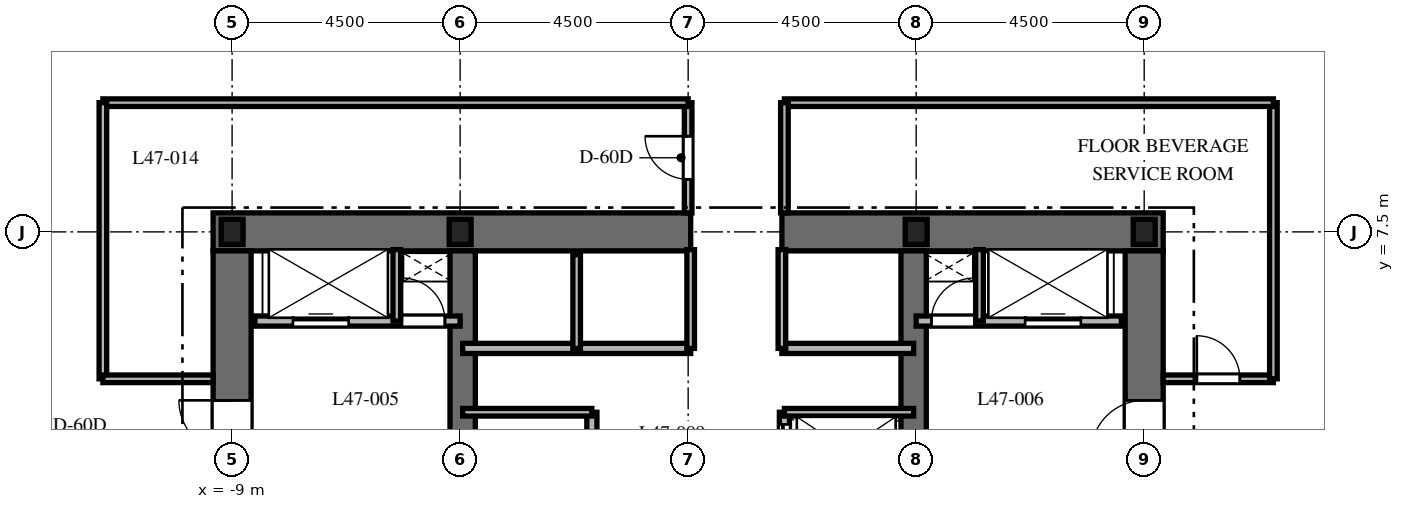
"""IFC4 building model, lengths in metres.
Left out: names, types, materials, properties, quantities, classifications, styles, units other than length and angle.
Written with IfcOpenShell. Run it as: python <this file> out.ifc"""

import sys

from ifc_helpers import new_model, si_unit, direction, frame, frame_2d, origin, origin_2d, place, context, subcontext, project, spatial, rectangle, i_section, extrude, element, fill, save


model = new_model("IFC4")
c1 = context("Model", 3, precision=1e-05, world=origin(), true_north=direction((0.0, 1.0)))
c2 = subcontext(c1, "Body", "Model", "MODEL_VIEW")
j1 = project(units=[si_unit("LENGTHUNIT", "METRE"), si_unit("PLANEANGLEUNIT", "RADIAN")], contexts=[c1])
p1 = place(None, origin())
s1 = spatial("IfcSite", under=j1, at=p1, CompositionType="ELEMENT")
p2 = place(p1, origin())
s2 = spatial("IfcBuilding", under=s1, at=p2, CompositionType="ELEMENT")
p3 = place(p2, frame((0.0, 0.0, 190.4)))
s3 = spatial("IfcBuildingStorey", under=s2, at=p3, CompositionType="ELEMENT", Elevation=190.4)
p4 = place(p3, frame((-9.375, 7.5, 0.0), z_axis=(0.0, 0.0, 1.0), x_axis=(1.0, 0.0, 0.0)))
e1 = element("IfcWall", 1, at=p4, inside=s3, PredefinedType="SHEAR", context=c2, shape_type="SweptSolid", body=[
    extrude(rectangle(XDim=9.425, YDim=0.75, at=frame_2d((4.712, 0.0))), origin(), (0.0, 0.0, 1.0), 3.7),
])
p5 = place(p3, frame((1.85, 7.5, 0.0), z_axis=(0.0, 0.0, 1.0), x_axis=(1.0, 0.0, 0.0)))
e2 = element("IfcWall", 2, at=p5, inside=s3, PredefinedType="SHEAR", context=c2, shape_type="SweptSolid", body=[
    extrude(rectangle(XDim=7.525, YDim=0.75, at=frame_2d((3.762, 0.0))), origin(), (0.0, 0.0, 1.0), 3.7),
])
p6 = place(p3, frame((-9.0, -7.125, 0.0), z_axis=(0.0, 0.0, 1.0), x_axis=(0.0, 1.0, 0.0)))
e3 = element("IfcWall", 3, at=p6, inside=s3, PredefinedType="SHEAR", context=c2, shape_type="SweptSolid", body=[
    extrude(rectangle(XDim=14.25, YDim=0.75, at=frame_2d((7.125, 0.0))), origin(), (0.0, 0.0, 1.0), 3.7),
])
p7 = place(p6, frame((10.25, 0.0, 0.0)))
e4 = element("IfcOpeningElement", 4, at=p7, cuts=e3, PredefinedType="OPENING", context=c2, shape_type="SweptSolid", body=[
    extrude(rectangle(XDim=1.05, YDim=2.15, at=frame_2d((0.525, 1.075))), frame((0.0, 0.385, 0.0), z_axis=(0.0, -1.0, 0.0), x_axis=(1.0, 0.0, 0.0)), (0.0, 0.0, 1.0), 0.77),
])
p8 = place(p3, frame((9.0, -7.125, 0.0), z_axis=(0.0, 0.0, 1.0), x_axis=(0.0, 1.0, 0.0)))
e5 = element("IfcWall", 5, at=p8, inside=s3, PredefinedType="SHEAR", context=c2, shape_type="SweptSolid", body=[
    extrude(rectangle(XDim=14.25, YDim=0.75, at=frame_2d((7.125, 0.0))), origin(), (0.0, 0.0, 1.0), 3.7),
])
p9 = place(p8, frame((10.25, 0.0, 0.0)))
e6 = element("IfcOpeningElement", 6, at=p9, cuts=e5, PredefinedType="OPENING", context=c2, shape_type="SweptSolid", body=[
    extrude(rectangle(XDim=1.05, YDim=2.15, at=frame_2d((0.525, 1.075))), frame((0.0, 0.385, 0.0), z_axis=(0.0, -1.0, 0.0), x_axis=(1.0, 0.0, 0.0)), (0.0, 0.0, 1.0), 0.77),
])
for number, where, z_axis, x_axis in (
    (7, (-4.45, 2.25, 0.0), (0.0, 0.0, 1.0), (0.0, 1.0, 0.0)),
    (8, (4.45, 2.25, 0.0), (0.0, 0.0, 1.0), (0.0, 1.0, 0.0)),
):
    element("IfcWall", number, at=place(p3, frame(where, z_axis=z_axis, x_axis=x_axis)), inside=s3, PredefinedType="SHEAR", context=c2, shape_type="SweptSolid", body=[
        extrude(rectangle(XDim=4.875, YDim=0.5, at=frame_2d((2.438, 0.0))), origin(), (0.0, 0.0, 1.0), 3.7),
    ])
for number, where, z_axis, x_axis in (
    (9, (9.0, 7.5, 0.0), (0.0, 0.0, 1.0), (1.0, 0.0, 0.0)),
    (10, (4.5, 7.5, 0.0), (0.0, 0.0, 1.0), (1.0, 0.0, 0.0)),
    (11, (-4.5, 7.5, 0.0), (0.0, 0.0, 1.0), (1.0, 0.0, 0.0)),
    (12, (-9.0, 7.5, 0.0), (0.0, 0.0, 1.0), (1.0, 0.0, 0.0)),
):
    element("IfcColumn", number, at=place(p3, frame(where, z_axis=z_axis, x_axis=x_axis)), inside=s3, PredefinedType="COLUMN", context=c2, shape_type="SweptSolid", body=[
        extrude(i_section(OverallWidth=0.432, OverallDepth=0.498, WebThickness=0.056, FlangeThickness=0.089, at=origin_2d()), origin(), (0.0, 0.0, 1.0), 3.7),
    ])
p10 = place(p3, frame((-8.55, 5.74, 0.0), z_axis=(0.0, 0.0, 1.0), x_axis=(1.0, 0.0, 0.0)))
e13 = element("IfcWall", 13, at=p10, inside=s3, PredefinedType="PARTITIONING", context=c2, shape_type="SweptSolid", body=[
    extrude(rectangle(XDim=4.05, YDim=0.2, at=frame_2d((2.025, 0.0))), origin(), (0.0, 0.0, 1.0), 3.4),
])
p11 = place(p10, frame((0.75, 0.0, 0.0)))
e14 = element("IfcOpeningElement", 14, at=p11, cuts=e13, PredefinedType="OPENING", context=c2, shape_type="SweptSolid", body=[
    extrude(rectangle(XDim=1.1, YDim=2.2, at=frame_2d((0.55, 1.1))), frame((0.0, 0.11, 0.0), z_axis=(0.0, -1.0, 0.0), x_axis=(1.0, 0.0, 0.0)), (0.0, 0.0, 1.0), 0.22),
])
p12 = place(p10, frame((2.9, 0.0, 0.0)))
e15 = element("IfcOpeningElement", 15, at=p12, cuts=e13, PredefinedType="OPENING", context=c2, shape_type="SweptSolid", body=[
    extrude(rectangle(XDim=0.85, YDim=2.03, at=frame_2d((0.425, 1.015))), frame((0.0, 0.11, 0.0), z_axis=(0.0, -1.0, 0.0), x_axis=(1.0, 0.0, 0.0)), (0.0, 0.0, 1.0), 0.22),
])
p13 = place(p3, frame((-5.75, 5.74, 0.0), z_axis=(0.0, 0.0, 1.0), x_axis=(0.0, 1.0, 0.0)))
e16 = element("IfcWall", 16, at=p13, inside=s3, PredefinedType="PARTITIONING", context=c2, shape_type="SweptSolid", body=[
    extrude(rectangle(XDim=1.41, YDim=0.15, at=frame_2d((0.705, 0.0))), origin(), (0.0, 0.0, 1.0), 3.4),
])
p14 = place(p3, frame((4.5, 5.74, 0.0), z_axis=(0.0, 0.0, 1.0), x_axis=(1.0, 0.0, 0.0)))
e17 = element("IfcWall", 17, at=p14, inside=s3, PredefinedType="PARTITIONING", context=c2, shape_type="SweptSolid", body=[
    extrude(rectangle(XDim=4.05, YDim=0.2, at=frame_2d((2.025, 0.0))), origin(), (0.0, 0.0, 1.0), 3.4),
])
p15 = place(p14, frame((0.3, 0.0, 0.0)))
e18 = element("IfcOpeningElement", 18, at=p15, cuts=e17, PredefinedType="OPENING", context=c2, shape_type="SweptSolid", body=[
    extrude(rectangle(XDim=0.85, YDim=2.03, at=frame_2d((0.425, 1.015))), frame((0.0, 0.11, 0.0), z_axis=(0.0, -1.0, 0.0), x_axis=(1.0, 0.0, 0.0)), (0.0, 0.0, 1.0), 0.22),
])
p16 = place(p14, frame((2.15, 0.0, 0.0)))
e19 = element("IfcOpeningElement", 19, at=p16, cuts=e17, PredefinedType="OPENING", context=c2, shape_type="SweptSolid", body=[
    extrude(rectangle(XDim=1.1, YDim=2.2, at=frame_2d((0.55, 1.1))), frame((0.0, 0.11, 0.0), z_axis=(0.0, -1.0, 0.0), x_axis=(1.0, 0.0, 0.0)), (0.0, 0.0, 1.0), 0.22),
])
p17 = place(p3, frame((5.75, 5.74, 0.0), z_axis=(0.0, 0.0, 1.0), x_axis=(0.0, 1.0, 0.0)))
e20 = element("IfcWall", 20, at=p17, inside=s3, PredefinedType="PARTITIONING", context=c2, shape_type="SweptSolid", body=[
    extrude(rectangle(XDim=1.41, YDim=0.15, at=frame_2d((0.705, 0.0))), origin(), (0.0, 0.0, 1.0), 3.4),
])
p18 = place(p3, frame((-4.45, 5.2, 0.0), z_axis=(0.0, 0.0, 1.0), x_axis=(1.0, 0.0, 0.0)))
e21 = element("IfcWall", 21, at=p18, inside=s3, PredefinedType="PARTITIONING", context=c2, shape_type="SweptSolid", body=[
    extrude(rectangle(XDim=4.5, YDim=0.2, at=frame_2d((2.25, 0.0))), origin(), (0.0, 0.0, 1.0), 3.4),
])
p19 = place(p3, frame((1.85, 5.2, 0.0), z_axis=(0.0, 0.0, 1.0), x_axis=(1.0, 0.0, 0.0)))
e22 = element("IfcWall", 22, at=p19, inside=s3, PredefinedType="PARTITIONING", context=c2, shape_type="SweptSolid", body=[
    extrude(rectangle(XDim=2.6, YDim=0.2, at=frame_2d((1.3, 0.0))), origin(), (0.0, 0.0, 1.0), 3.4),
])
p20 = place(p3, frame((-2.2, 5.2, 0.0), z_axis=(0.0, 0.0, 1.0), x_axis=(0.0, 1.0, 0.0)))
e23 = element("IfcWall", 23, at=p20, inside=s3, PredefinedType="PARTITIONING", context=c2, shape_type="SweptSolid", body=[
    extrude(rectangle(XDim=1.85, YDim=0.15, at=frame_2d((0.925, 0.0))), origin(), (0.0, 0.0, 1.0), 3.4),
])
for number, where, z_axis, x_axis in (
    (24, (0.05, 5.2, 0.0), (0.0, 0.0, 1.0), (0.0, 1.0, 0.0)),
    (25, (1.85, 5.2, 0.0), (0.0, 0.0, 1.0), (0.0, 1.0, 0.0)),
):
    element("IfcWall", number, at=place(p3, frame(where, z_axis=z_axis, x_axis=x_axis)), inside=s3, PredefinedType="PARTITIONING", context=c2, shape_type="SweptSolid", body=[
        extrude(rectangle(XDim=1.95, YDim=0.15, at=frame_2d((0.975, 0.0))), origin(), (0.0, 0.0, 1.0), 3.4),
    ])
p21 = place(p3, frame((-1.9, -0.5, 0.0), z_axis=(0.0, 0.0, 1.0), x_axis=(0.0, 1.0, 0.0)))
e26 = element("IfcWall", 26, at=p21, inside=s3, PredefinedType="PARTITIONING", context=c2, shape_type="SweptSolid", body=[
    extrude(rectangle(XDim=4.44, YDim=0.2, at=frame_2d((2.22, 0.0))), origin(), (0.0, 0.0, 1.0), 3.4),
])
p22 = place(p21, frame((1.5, 0.0, 0.0)))
e27 = element("IfcOpeningElement", 27, at=p22, cuts=e26, PredefinedType="OPENING", context=c2, shape_type="SweptSolid", body=[
    extrude(rectangle(XDim=0.85, YDim=2.03, at=frame_2d((0.425, 1.015))), frame((0.0, 0.11, 0.0), z_axis=(0.0, -1.0, 0.0), x_axis=(1.0, 0.0, 0.0)), (0.0, 0.0, 1.0), 0.22),
])
p23 = place(p3, frame((-4.45, 3.94, 0.0), z_axis=(0.0, 0.0, 1.0), x_axis=(1.0, 0.0, 0.0)))
e28 = element("IfcWall", 28, at=p23, inside=s3, PredefinedType="PARTITIONING", context=c2, shape_type="SweptSolid", body=[
    extrude(rectangle(XDim=2.55, YDim=0.15, at=frame_2d((1.275, 0.0))), origin(), (0.0, 0.0, 1.0), 3.4),
])
p24 = place(p3, frame((1.9, -0.5, 0.0), z_axis=(0.0, 0.0, 1.0), x_axis=(0.0, 1.0, 0.0)))
e29 = element("IfcWall", 29, at=p24, inside=s3, PredefinedType="PARTITIONING", context=c2, shape_type="SweptSolid", body=[
    extrude(rectangle(XDim=4.44, YDim=0.2, at=frame_2d((2.22, 0.0))), origin(), (0.0, 0.0, 1.0), 3.4),
])
p25 = place(p24, frame((0.24, 0.0, 0.0)))
e30 = element("IfcOpeningElement", 30, at=p25, cuts=e29, PredefinedType="OPENING", context=c2, shape_type="SweptSolid", body=[
    extrude(rectangle(XDim=1.0, YDim=2.2, at=frame_2d((0.5, 1.1))), frame((0.0, 0.11, 0.0), z_axis=(0.0, -1.0, 0.0), x_axis=(1.0, 0.0, 0.0)), (0.0, 0.0, 1.0), 0.22),
])
p26 = place(p24, frame((1.72, 0.0, 0.0)))
e31 = element("IfcOpeningElement", 31, at=p26, cuts=e29, PredefinedType="OPENING", context=c2, shape_type="SweptSolid", body=[
    extrude(rectangle(XDim=1.0, YDim=2.2, at=frame_2d((0.5, 1.1))), frame((0.0, 0.11, 0.0), z_axis=(0.0, -1.0, 0.0), x_axis=(1.0, 0.0, 0.0)), (0.0, 0.0, 1.0), 0.22),
])
p27 = place(p24, frame((3.2, 0.0, 0.0)))
e32 = element("IfcOpeningElement", 32, at=p27, cuts=e29, PredefinedType="OPENING", context=c2, shape_type="SweptSolid", body=[
    extrude(rectangle(XDim=1.0, YDim=2.2, at=frame_2d((0.5, 1.1))), frame((0.0, 0.11, 0.0), z_axis=(0.0, -1.0, 0.0), x_axis=(1.0, 0.0, 0.0)), (0.0, 0.0, 1.0), 0.22),
])
p28 = place(p3, frame((1.9, 3.94, 0.0), z_axis=(0.0, 0.0, 1.0), x_axis=(1.0, 0.0, 0.0)))
e33 = element("IfcWall", 33, at=p28, inside=s3, PredefinedType="PARTITIONING", context=c2, shape_type="SweptSolid", body=[
    extrude(rectangle(XDim=2.55, YDim=0.15, at=frame_2d((1.275, 0.0))), origin(), (0.0, 0.0, 1.0), 3.4),
])
p29 = place(p3, frame((9.375, 4.6, 0.0), z_axis=(0.0, 0.0, 1.0), x_axis=(1.0, 0.0, 0.0)))
e34 = element("IfcWall", 34, at=p29, inside=s3, PredefinedType="PARTITIONING", context=c2, shape_type="SweptSolid", body=[
    extrude(rectangle(XDim=2.175, YDim=0.15, at=frame_2d((1.087, 0.0))), origin(), (0.0, 0.0, 1.0), 3.4),
])
p30 = place(p29, frame((0.663, 0.0, 0.0)))
e35 = element("IfcOpeningElement", 35, at=p30, cuts=e34, PredefinedType="OPENING", context=c2, shape_type="SweptSolid", body=[
    extrude(rectangle(XDim=0.85, YDim=2.03, at=frame_2d((0.425, 1.015))), frame((0.0, 0.085, 0.0), z_axis=(0.0, -1.0, 0.0), x_axis=(1.0, 0.0, 0.0)), (0.0, 0.0, 1.0), 0.17),
])
p31 = place(p3, frame((11.55, 4.6, 0.0), z_axis=(0.0, 0.0, 1.0), x_axis=(0.0, 1.0, 0.0)))
e36 = element("IfcWall", 36, at=p31, inside=s3, PredefinedType="PARTITIONING", context=c2, shape_type="SweptSolid", body=[
    extrude(rectangle(XDim=5.45, YDim=0.15, at=frame_2d((2.725, 0.0))), origin(), (0.0, 0.0, 1.0), 2.84),
])
p32 = place(p3, frame((11.55, 10.05, 0.0), z_axis=(0.0, 0.0, 1.0), x_axis=(-1.0, 0.0, 0.0)))
e37 = element("IfcWall", 37, at=p32, inside=s3, PredefinedType="PARTITIONING", context=c2, shape_type="SweptSolid", body=[
    extrude(rectangle(XDim=9.65, YDim=0.15, at=frame_2d((4.825, 0.0))), origin(), (0.0, 0.0, 1.0), 2.84),
])
p33 = place(p3, frame((1.9, 10.05, 0.0), z_axis=(0.0, 0.0, 1.0), x_axis=(0.0, -1.0, 0.0)))
e38 = element("IfcWall", 38, at=p33, inside=s3, PredefinedType="PARTITIONING", context=c2, shape_type="SweptSolid", body=[
    extrude(rectangle(XDim=2.175, YDim=0.15, at=frame_2d((1.087, 0.0))), origin(), (0.0, 0.0, 1.0), 3.4),
])
p34 = place(p3, frame((0.0, 7.875, 0.0), z_axis=(0.0, 0.0, 1.0), x_axis=(0.0, 1.0, 0.0)))
e39 = element("IfcWall", 39, at=p34, inside=s3, PredefinedType="PARTITIONING", context=c2, shape_type="SweptSolid", body=[
    extrude(rectangle(XDim=2.175, YDim=0.15, at=frame_2d((1.087, 0.0))), origin(), (0.0, 0.0, 1.0), 3.4),
])
p35 = place(p34, frame((0.663, 0.0, 0.0)))
e40 = element("IfcOpeningElement", 40, at=p35, cuts=e39, PredefinedType="OPENING", context=c2, shape_type="SweptSolid", body=[
    extrude(rectangle(XDim=0.85, YDim=2.03, at=frame_2d((0.425, 1.015))), frame((0.0, 0.085, 0.0), z_axis=(0.0, -1.0, 0.0), x_axis=(1.0, 0.0, 0.0)), (0.0, 0.0, 1.0), 0.17),
])
p36 = place(p3, frame((0.0, 10.05, 0.0), z_axis=(0.0, 0.0, 1.0), x_axis=(-1.0, 0.0, 0.0)))
e41 = element("IfcWall", 41, at=p36, inside=s3, PredefinedType="PARTITIONING", context=c2, shape_type="SweptSolid", body=[
    extrude(rectangle(XDim=11.55, YDim=0.15, at=frame_2d((5.775, 0.0))), origin(), (0.0, 0.0, 1.0), 2.84),
])
p37 = place(p3, frame((-11.55, 10.05, 0.0), z_axis=(0.0, 0.0, 1.0), x_axis=(0.0, -1.0, 0.0)))
e42 = element("IfcWall", 42, at=p37, inside=s3, PredefinedType="PARTITIONING", context=c2, shape_type="SweptSolid", body=[
    extrude(rectangle(XDim=5.45, YDim=0.15, at=frame_2d((2.725, 0.0))), origin(), (0.0, 0.0, 1.0), 2.84),
])
p38 = place(p3, frame((-11.55, 4.6, 0.0), z_axis=(0.0, 0.0, 1.0), x_axis=(1.0, 0.0, 0.0)))
e43 = element("IfcWall", 43, at=p38, inside=s3, PredefinedType="PARTITIONING", context=c2, shape_type="SweptSolid", body=[
    extrude(rectangle(XDim=2.175, YDim=0.15, at=frame_2d((1.087, 0.0))), origin(), (0.0, 0.0, 1.0), 3.4),
])
p39 = place(p7, origin())
e44 = element("IfcDoor", 44, at=p39, inside=s3, OperationType="SINGLE_SWING_RIGHT", PredefinedType="DOOR", context=c2, shape_type="SweptSolid", body=[
    extrude(rectangle(XDim=1.05, YDim=2.15, at=frame_2d((0.525, 1.075))), frame((0.0, 0.025, 0.0), z_axis=(0.0, -1.0, 0.0), x_axis=(1.0, 0.0, 0.0)), (0.0, 0.0, 1.0), 0.05),
])
fill(e4, e44)
p40 = place(p9, origin())
e45 = element("IfcDoor", 45, at=p40, inside=s3, OperationType="SINGLE_SWING_LEFT", PredefinedType="DOOR", context=c2, shape_type="SweptSolid", body=[
    extrude(rectangle(XDim=1.05, YDim=2.15, at=frame_2d((0.525, 1.075))), frame((0.0, 0.025, 0.0), z_axis=(0.0, -1.0, 0.0), x_axis=(1.0, 0.0, 0.0)), (0.0, 0.0, 1.0), 0.05),
])
fill(e6, e45)
p41 = place(p11, origin())
e46 = element("IfcDoor", 46, at=p41, inside=s3, OperationType="SLIDING_TO_LEFT", PredefinedType="DOOR", context=c2, shape_type="SweptSolid", body=[
    extrude(rectangle(XDim=1.1, YDim=2.2, at=frame_2d((0.55, 1.1))), frame((0.0, 0.025, 0.0), z_axis=(0.0, -1.0, 0.0), x_axis=(1.0, 0.0, 0.0)), (0.0, 0.0, 1.0), 0.05),
])
fill(e14, e46)
p42 = place(p12, origin())
e47 = element("IfcDoor", 47, at=p42, inside=s3, OperationType="SINGLE_SWING_LEFT", PredefinedType="DOOR", context=c2, shape_type="SweptSolid", body=[
    extrude(rectangle(XDim=0.85, YDim=2.03, at=frame_2d((0.425, 1.015))), frame((0.0, 0.025, 0.0), z_axis=(0.0, -1.0, 0.0), x_axis=(1.0, 0.0, 0.0)), (0.0, 0.0, 1.0), 0.05),
])
fill(e15, e47)
p43 = place(p15, origin())
e48 = element("IfcDoor", 48, at=p43, inside=s3, OperationType="SINGLE_SWING_RIGHT", PredefinedType="DOOR", context=c2, shape_type="SweptSolid", body=[
    extrude(rectangle(XDim=0.85, YDim=2.03, at=frame_2d((0.425, 1.015))), frame((0.0, 0.025, 0.0), z_axis=(0.0, -1.0, 0.0), x_axis=(1.0, 0.0, 0.0)), (0.0, 0.0, 1.0), 0.05),
])
fill(e18, e48)
p44 = place(p16, origin())
e49 = element("IfcDoor", 49, at=p44, inside=s3, OperationType="SLIDING_TO_RIGHT", PredefinedType="DOOR", context=c2, shape_type="SweptSolid", body=[
    extrude(rectangle(XDim=1.1, YDim=2.2, at=frame_2d((0.55, 1.1))), frame((0.0, 0.025, 0.0), z_axis=(0.0, -1.0, 0.0), x_axis=(1.0, 0.0, 0.0)), (0.0, 0.0, 1.0), 0.05),
])
fill(e19, e49)
p45 = place(p27, origin())
e50 = element("IfcDoor", 50, at=p45, inside=s3, OperationType="SLIDING_TO_RIGHT", PredefinedType="DOOR", context=c2, shape_type="SweptSolid", body=[
    extrude(rectangle(XDim=1.0, YDim=2.2, at=frame_2d((0.5, 1.1))), frame((0.0, 0.025, 0.0), z_axis=(0.0, -1.0, 0.0), x_axis=(1.0, 0.0, 0.0)), (0.0, 0.0, 1.0), 0.05),
])
fill(e32, e50)
p46 = place(p35, origin())
e51 = element("IfcDoor", 51, at=p46, inside=s3, OperationType="SINGLE_SWING_RIGHT", PredefinedType="DOOR", context=c2, shape_type="SweptSolid", body=[
    extrude(rectangle(XDim=0.85, YDim=2.03, at=frame_2d((0.425, 1.015))), frame((0.0, 0.025, 0.0), z_axis=(0.0, -1.0, 0.0), x_axis=(1.0, 0.0, 0.0)), (0.0, 0.0, 1.0), 0.05),
])
fill(e40, e51)
p47 = place(p30, origin())
e52 = element("IfcDoor", 52, at=p47, inside=s3, OperationType="SINGLE_SWING_LEFT", PredefinedType="DOOR", context=c2, shape_type="SweptSolid", body=[
    extrude(rectangle(XDim=0.85, YDim=2.03, at=frame_2d((0.425, 1.015))), frame((0.0, 0.025, 0.0), z_axis=(0.0, -1.0, 0.0), x_axis=(1.0, 0.0, 0.0)), (0.0, 0.0, 1.0), 0.05),
])
fill(e35, e52)
save(model, sys.argv[1])
